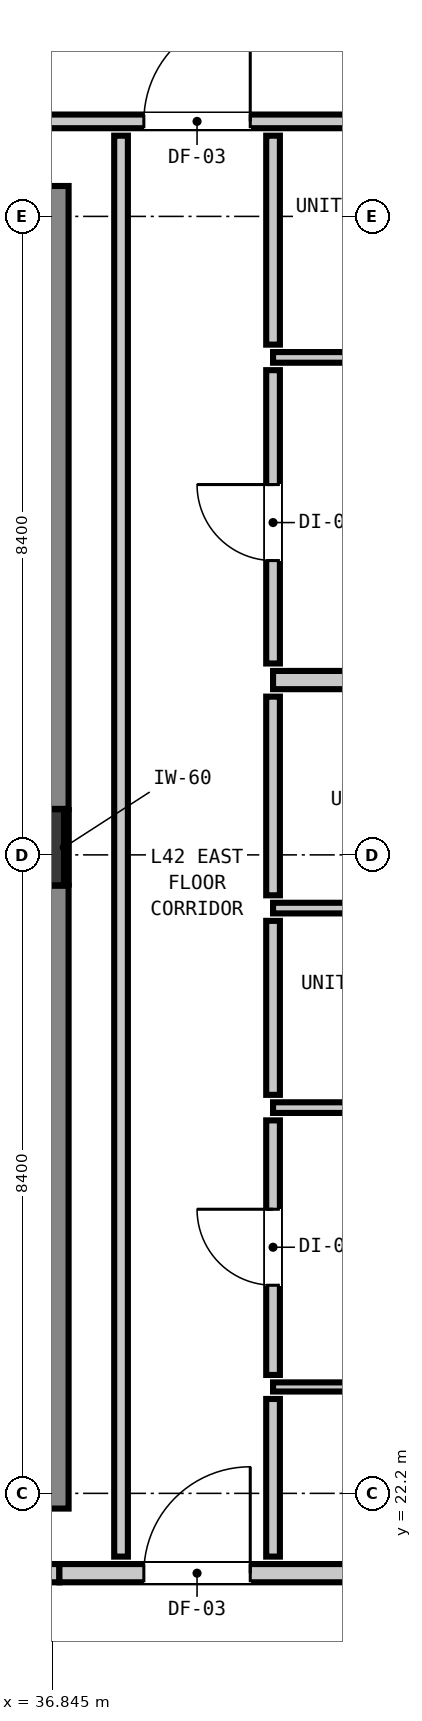
"""IFC4 building model, lengths in metres.
Left out: names, types, materials, properties, quantities, classifications, styles, units other than length and angle.
Written with IfcOpenShell. Run it as: python <this file> out.ifc"""

import sys

from ifc_helpers import new_model, si_unit, direction, frame, frame_2d, origin, origin_2d, place, context, subcontext, project, spatial, rectangle, extrude, element, fill, save


model = new_model("IFC4")
c1 = context("Model", 3, precision=1e-05, world=origin(), true_north=direction((0.0, 1.0)))
c2 = subcontext(c1, "Body", "Model", "MODEL_VIEW")
j1 = project(units=[si_unit("LENGTHUNIT", "METRE"), si_unit("PLANEANGLEUNIT", "RADIAN")], contexts=[c1])
p1 = place(None, origin())
s1 = spatial("IfcSite", under=j1, at=p1, CompositionType="ELEMENT")
p2 = place(p1, origin())
s2 = spatial("IfcBuilding", under=s1, at=p2, CompositionType="ELEMENT")
p3 = place(p2, frame((0.0, 0.0, 145.92)))
s3 = spatial("IfcBuildingStorey", under=s2, at=p3, CompositionType="ELEMENT", Elevation=145.92)
p4 = place(p3, frame((36.5, 30.7, 0.0), z_axis=(0.0, 0.0, 1.0), x_axis=(1.0, 0.0, 0.0)))
e1 = element("IfcColumn", 1, at=p4, inside=s3, PredefinedType="COLUMN", context=c2, shape_type="SweptSolid", body=[
    extrude(rectangle(XDim=1.0, YDim=1.0, at=origin_2d()), origin(), (0.0, 0.0, 1.0), 3.32),
])
p5 = place(p3, frame((36.56, 22.0, 0.0), z_axis=(0.0, 0.0, 1.0), x_axis=(0.0, 1.0, 0.0)))
e2 = element("IfcWall", 2, at=p5, inside=s3, PredefinedType="SHEAR", context=c2, shape_type="SweptSolid", body=[
    extrude(rectangle(XDim=8.195, YDim=1.0, at=frame_2d((4.098, 0.0))), origin(), (0.0, 0.0, 1.0), 3.32),
])
p6 = place(p3, frame((36.56, 31.205, 0.0), z_axis=(0.0, 0.0, 1.0), x_axis=(0.0, 1.0, 0.0)))
e3 = element("IfcWall", 3, at=p6, inside=s3, PredefinedType="SHEAR", context=c2, shape_type="SweptSolid", body=[
    extrude(rectangle(XDim=8.195, YDim=1.0, at=frame_2d((4.097, 0.0))), origin(), (0.0, 0.0, 1.0), 3.32),
])
p7 = place(p3, frame((9.407, 21.15, 0.0), z_axis=(0.0, 0.0, 1.0), x_axis=(1.0, 0.0, 0.0)))
e4 = element("IfcWall", 4, at=p7, inside=s3, PredefinedType="PARTITIONING", context=c2, shape_type="SweptSolid", body=[
    extrude(rectangle(XDim=27.532, YDim=0.24, at=frame_2d((13.766, 0.0))), origin(), (0.0, 0.0, 1.0), 3.08),
])
p8 = place(p7, frame((8.803, 0.0, 0.0)))
e5 = element("IfcOpeningElement", 5, at=p8, cuts=e4, PredefinedType="OPENING", context=c2, shape_type="SweptSolid", body=[
    extrude(rectangle(XDim=1.1, YDim=2.15, at=frame_2d((0.55, 1.075))), frame((0.0, 0.13, 0.0), z_axis=(0.0, -1.0, 0.0), x_axis=(1.0, 0.0, 0.0)), (0.0, 0.0, 1.0), 0.26),
])
p9 = place(p7, frame((1.192, 0.0, 0.0)))
e6 = element("IfcOpeningElement", 6, at=p9, cuts=e4, PredefinedType="OPENING", context=c2, shape_type="SweptSolid", body=[
    extrude(rectangle(XDim=1.4, YDim=2.15, at=frame_2d((0.7, 1.075))), frame((0.0, 0.13, 0.0), z_axis=(0.0, -1.0, 0.0), x_axis=(1.0, 0.0, 0.0)), (0.0, 0.0, 1.0), 0.26),
])
p10 = place(p3, frame((36.939, 21.15, 0.0), z_axis=(0.0, 0.0, 1.0), x_axis=(1.0, 0.0, 0.0)))
e7 = element("IfcWall", 7, at=p10, inside=s3, PredefinedType="PARTITIONING", context=c2, shape_type="SweptSolid", body=[
    extrude(rectangle(XDim=10.972, YDim=0.24, at=frame_2d((5.486, 0.0))), origin(), (0.0, 0.0, 1.0), 2.565),
])
p11 = place(p10, frame((1.111, 0.0, 0.0)))
e8 = element("IfcOpeningElement", 8, at=p11, cuts=e7, PredefinedType="OPENING", context=c2, shape_type="SweptSolid", body=[
    extrude(rectangle(XDim=1.4, YDim=2.15, at=frame_2d((0.7, 1.075))), frame((0.0, 0.13, 0.0), z_axis=(0.0, -1.0, 0.0), x_axis=(1.0, 0.0, 0.0)), (0.0, 0.0, 1.0), 0.26),
])
p12 = place(p3, frame((39.75, 32.9, 0.0), z_axis=(0.0, 0.0, 1.0), x_axis=(1.0, 0.0, 0.0)))
e9 = element("IfcWall", 9, at=p12, inside=s3, PredefinedType="PARTITIONING", context=c2, shape_type="SweptSolid", body=[
    extrude(rectangle(XDim=9.043, YDim=0.24, at=frame_2d((4.521, 0.0))), origin(), (0.0, 0.0, 1.0), 3.08),
])
p13 = place(p12, frame((4.075, 0.0, 0.0)))
e10 = element("IfcOpeningElement", 10, at=p13, cuts=e9, PredefinedType="OPENING", context=c2, shape_type="SweptSolid", body=[
    extrude(rectangle(XDim=0.9, YDim=2.1, at=frame_2d((0.45, 1.05))), frame((0.0, 0.13, 0.0), z_axis=(0.0, -1.0, 0.0), x_axis=(1.0, 0.0, 0.0)), (0.0, 0.0, 1.0), 0.26),
])
p14 = place(p3, frame((9.407, 40.25, 0.0), z_axis=(0.0, 0.0, 1.0), x_axis=(1.0, 0.0, 0.0)))
e11 = element("IfcWall", 11, at=p14, inside=s3, PredefinedType="PARTITIONING", context=c2, shape_type="SweptSolid", body=[
    extrude(rectangle(XDim=39.386, YDim=0.18, at=frame_2d((19.693, 0.0))), origin(), (0.0, 0.0, 1.0), 3.08),
])
p15 = place(p14, frame((8.028, 0.0, 0.0)))
e12 = element("IfcOpeningElement", 12, at=p15, cuts=e11, PredefinedType="OPENING", context=c2, shape_type="SweptSolid", body=[
    extrude(rectangle(XDim=1.4, YDim=2.15, at=frame_2d((0.7, 1.075))), frame((0.0, 0.1, 0.0), z_axis=(0.0, -1.0, 0.0), x_axis=(1.0, 0.0, 0.0)), (0.0, 0.0, 1.0), 0.2),
])
p16 = place(p14, frame((1.192, 0.0, 0.0)))
e13 = element("IfcOpeningElement", 13, at=p16, cuts=e11, PredefinedType="OPENING", context=c2, shape_type="SweptSolid", body=[
    extrude(rectangle(XDim=1.4, YDim=2.15, at=frame_2d((0.7, 1.075))), frame((0.0, 0.1, 0.0), z_axis=(0.0, -1.0, 0.0), x_axis=(1.0, 0.0, 0.0)), (0.0, 0.0, 1.0), 0.2),
])
p17 = place(p14, frame((28.643, 0.0, 0.0)))
e14 = element("IfcOpeningElement", 14, at=p17, cuts=e11, PredefinedType="OPENING", context=c2, shape_type="SweptSolid", body=[
    extrude(rectangle(XDim=1.4, YDim=2.15, at=frame_2d((0.7, 1.075))), frame((0.0, 0.1, 0.0), z_axis=(0.0, -1.0, 0.0), x_axis=(1.0, 0.0, 0.0)), (0.0, 0.0, 1.0), 0.2),
])
p18 = place(p3, frame((39.75, 27.275, 0.0), z_axis=(0.0, 0.0, 1.0), x_axis=(1.0, 0.0, 0.0)))
e15 = element("IfcWall", 15, at=p18, inside=s3, PredefinedType="PARTITIONING", context=c2, shape_type="SweptSolid", body=[
    extrude(rectangle(XDim=9.043, YDim=0.14, at=frame_2d((4.521, 0.0))), origin(), (0.0, 0.0, 1.0), 3.08),
])
p19 = place(p18, frame((1.708, 0.0, 0.0)))
e16 = element("IfcOpeningElement", 16, at=p19, cuts=e15, PredefinedType="OPENING", context=c2, shape_type="SweptSolid", body=[
    extrude(rectangle(XDim=0.86, YDim=2.02, at=frame_2d((0.43, 1.01))), frame((0.0, 0.08, 0.0), z_axis=(0.0, -1.0, 0.0), x_axis=(1.0, 0.0, 0.0)), (0.0, 0.0, 1.0), 0.16),
])
p20 = place(p18, frame((6.187, 0.0, 0.0)))
e17 = element("IfcOpeningElement", 17, at=p20, cuts=e15, PredefinedType="OPENING", context=c2, shape_type="SweptSolid", body=[
    extrude(rectangle(XDim=0.9, YDim=2.1, at=frame_2d((0.45, 1.05))), frame((0.0, 0.08, 0.0), z_axis=(0.0, -1.0, 0.0), x_axis=(1.0, 0.0, 0.0)), (0.0, 0.0, 1.0), 0.16),
])
p21 = place(p3, frame((39.75, 29.9, 0.0), z_axis=(0.0, 0.0, 1.0), x_axis=(1.0, 0.0, 0.0)))
e18 = element("IfcWall", 18, at=p21, inside=s3, PredefinedType="PARTITIONING", context=c2, shape_type="SweptSolid", body=[
    extrude(rectangle(XDim=9.043, YDim=0.14, at=frame_2d((4.521, 0.0))), origin(), (0.0, 0.0, 1.0), 3.08),
])
p22 = place(p3, frame((39.75, 37.145, 0.0), z_axis=(0.0, 0.0, 1.0), x_axis=(1.0, 0.0, 0.0)))
e19 = element("IfcWall", 19, at=p22, inside=s3, PredefinedType="PARTITIONING", context=c2, shape_type="SweptSolid", body=[
    extrude(rectangle(XDim=9.043, YDim=0.14, at=frame_2d((4.521, 0.0))), origin(), (0.0, 0.0, 1.0), 3.08),
])
p23 = place(p22, frame((1.708, 0.0, 0.0)))
e20 = element("IfcOpeningElement", 20, at=p23, cuts=e19, PredefinedType="OPENING", context=c2, shape_type="SweptSolid", body=[
    extrude(rectangle(XDim=0.86, YDim=2.02, at=frame_2d((0.43, 1.01))), frame((0.0, 0.08, 0.0), z_axis=(0.0, -1.0, 0.0), x_axis=(1.0, 0.0, 0.0)), (0.0, 0.0, 1.0), 0.16),
])
p24 = place(p22, frame((6.187, 0.0, 0.0)))
e21 = element("IfcOpeningElement", 21, at=p24, cuts=e19, PredefinedType="OPENING", context=c2, shape_type="SweptSolid", body=[
    extrude(rectangle(XDim=0.9, YDim=2.1, at=frame_2d((0.45, 1.05))), frame((0.0, 0.08, 0.0), z_axis=(0.0, -1.0, 0.0), x_axis=(1.0, 0.0, 0.0)), (0.0, 0.0, 1.0), 0.16),
])
p25 = place(p3, frame((39.75, 23.6, 0.0), z_axis=(0.0, 0.0, 1.0), x_axis=(1.0, 0.0, 0.0)))
e22 = element("IfcWall", 22, at=p25, inside=s3, PredefinedType="PARTITIONING", context=c2, shape_type="SweptSolid", body=[
    extrude(rectangle(XDim=9.043, YDim=0.12, at=frame_2d((4.521, 0.0))), origin(), (0.0, 0.0, 1.0), 3.08),
])
p26 = place(p25, frame((4.075, 0.0, 0.0)))
e23 = element("IfcOpeningElement", 23, at=p26, cuts=e22, PredefinedType="OPENING", context=c2, shape_type="SweptSolid", body=[
    extrude(rectangle(XDim=0.9, YDim=2.1, at=frame_2d((0.45, 1.05))), frame((0.0, 0.07, 0.0), z_axis=(0.0, -1.0, 0.0), x_axis=(1.0, 0.0, 0.0)), (0.0, 0.0, 1.0), 0.14),
])
p27 = place(p3, frame((37.75, 21.368, 0.0), z_axis=(0.0, 0.0, 1.0), x_axis=(0.0, 1.0, 0.0)))
e24 = element("IfcWall", 24, at=p27, inside=s3, PredefinedType="PARTITIONING", context=c2, shape_type="SweptSolid", body=[
    extrude(rectangle(XDim=18.694, YDim=0.18, at=frame_2d((9.347, 0.0))), origin(), (0.0, 0.0, 1.0), 3.08),
])
p28 = place(p3, frame((39.75, 21.368, 0.0), z_axis=(0.0, 0.0, 1.0), x_axis=(0.0, 1.0, 0.0)))
e25 = element("IfcWall", 25, at=p28, inside=s3, PredefinedType="PARTITIONING", context=c2, shape_type="SweptSolid", body=[
    extrude(rectangle(XDim=2.074, YDim=0.18, at=frame_2d((1.037, 0.0))), origin(), (0.0, 0.0, 1.0), 3.08),
])
p29 = place(p3, frame((39.75, 23.758, 0.0), z_axis=(0.0, 0.0, 1.0), x_axis=(0.0, 1.0, 0.0)))
e26 = element("IfcWall", 26, at=p29, inside=s3, PredefinedType="PARTITIONING", context=c2, shape_type="SweptSolid", body=[
    extrude(rectangle(XDim=3.349, YDim=0.18, at=frame_2d((1.674, 0.0))), origin(), (0.0, 0.0, 1.0), 3.08),
])
p30 = place(p29, frame((1.18, 0.0, 0.0)))
e27 = element("IfcOpeningElement", 27, at=p30, cuts=e26, PredefinedType="OPENING", context=c2, shape_type="SweptSolid", body=[
    extrude(rectangle(XDim=1.0, YDim=2.15, at=frame_2d((0.5, 1.075))), frame((0.0, 0.1, 0.0), z_axis=(0.0, -1.0, 0.0), x_axis=(1.0, 0.0, 0.0)), (0.0, 0.0, 1.0), 0.2),
])
p31 = place(p3, frame((39.75, 27.443, 0.0), z_axis=(0.0, 0.0, 1.0), x_axis=(0.0, 1.0, 0.0)))
e28 = element("IfcWall", 28, at=p31, inside=s3, PredefinedType="PARTITIONING", context=c2, shape_type="SweptSolid", body=[
    extrude(rectangle(XDim=2.289, YDim=0.18, at=frame_2d((1.145, 0.0))), origin(), (0.0, 0.0, 1.0), 3.08),
])
p32 = place(p3, frame((39.75, 30.068, 0.0), z_axis=(0.0, 0.0, 1.0), x_axis=(0.0, 1.0, 0.0)))
e29 = element("IfcWall", 29, at=p32, inside=s3, PredefinedType="PARTITIONING", context=c2, shape_type="SweptSolid", body=[
    extrude(rectangle(XDim=2.614, YDim=0.18, at=frame_2d((1.307, 0.0))), origin(), (0.0, 0.0, 1.0), 3.08),
])
p33 = place(p3, frame((39.75, 33.118, 0.0), z_axis=(0.0, 0.0, 1.0), x_axis=(0.0, 1.0, 0.0)))
e30 = element("IfcWall", 30, at=p33, inside=s3, PredefinedType="PARTITIONING", context=c2, shape_type="SweptSolid", body=[
    extrude(rectangle(XDim=3.859, YDim=0.18, at=frame_2d((1.93, 0.0))), origin(), (0.0, 0.0, 1.0), 3.08),
])
p34 = place(p33, frame((1.354, 0.0, 0.0)))
e31 = element("IfcOpeningElement", 31, at=p34, cuts=e30, PredefinedType="OPENING", context=c2, shape_type="SweptSolid", body=[
    extrude(rectangle(XDim=1.0, YDim=2.15, at=frame_2d((0.5, 1.075))), frame((0.0, 0.1, 0.0), z_axis=(0.0, -1.0, 0.0), x_axis=(1.0, 0.0, 0.0)), (0.0, 0.0, 1.0), 0.2),
])
p35 = place(p3, frame((39.75, 37.313, 0.0), z_axis=(0.0, 0.0, 1.0), x_axis=(0.0, 1.0, 0.0)))
e32 = element("IfcWall", 32, at=p35, inside=s3, PredefinedType="PARTITIONING", context=c2, shape_type="SweptSolid", body=[
    extrude(rectangle(XDim=2.749, YDim=0.18, at=frame_2d((1.375, 0.0))), origin(), (0.0, 0.0, 1.0), 3.08),
])
p36 = place(p3, frame((37.032, 30.21, 0.0), z_axis=(0.0, 0.0, 1.0), x_axis=(0.0, 1.0, 0.0)))
e33 = element("IfcWall", 33, at=p36, inside=s3, PredefinedType="PARTITIONING", context=c2, shape_type="SweptSolid", body=[
    extrude(rectangle(XDim=0.98, YDim=0.06, at=frame_2d((0.49, 0.0))), origin(), (0.0, 0.0, 1.0), 1.45),
])
p37 = place(p11, origin())
e34 = element("IfcDoor", 34, at=p37, inside=s3, OperationType="SINGLE_SWING_RIGHT", PredefinedType="DOOR", context=c2, shape_type="SweptSolid", body=[
    extrude(rectangle(XDim=1.4, YDim=2.15, at=frame_2d((0.7, 1.075))), frame((0.0, 0.025, 0.0), z_axis=(0.0, -1.0, 0.0), x_axis=(1.0, 0.0, 0.0)), (0.0, 0.0, 1.0), 0.05),
])
fill(e8, e34)
p38 = place(p17, origin())
e35 = element("IfcDoor", 35, at=p38, inside=s3, OperationType="SINGLE_SWING_RIGHT", PredefinedType="DOOR", context=c2, shape_type="SweptSolid", body=[
    extrude(rectangle(XDim=1.4, YDim=2.15, at=frame_2d((0.7, 1.075))), frame((0.0, 0.025, 0.0), z_axis=(0.0, -1.0, 0.0), x_axis=(1.0, 0.0, 0.0)), (0.0, 0.0, 1.0), 0.05),
])
fill(e14, e35)
p39 = place(p30, origin())
e36 = element("IfcDoor", 36, at=p39, inside=s3, OperationType="SINGLE_SWING_RIGHT", PredefinedType="DOOR", context=c2, shape_type="SweptSolid", body=[
    extrude(rectangle(XDim=1.0, YDim=2.15, at=frame_2d((0.5, 1.075))), frame((0.0, 0.025, 0.0), z_axis=(0.0, -1.0, 0.0), x_axis=(1.0, 0.0, 0.0)), (0.0, 0.0, 1.0), 0.05),
])
fill(e27, e36)
p40 = place(p34, origin())
e37 = element("IfcDoor", 37, at=p40, inside=s3, OperationType="SINGLE_SWING_RIGHT", PredefinedType="DOOR", context=c2, shape_type="SweptSolid", body=[
    extrude(rectangle(XDim=1.0, YDim=2.15, at=frame_2d((0.5, 1.075))), frame((0.0, 0.025, 0.0), z_axis=(0.0, -1.0, 0.0), x_axis=(1.0, 0.0, 0.0)), (0.0, 0.0, 1.0), 0.05),
])
fill(e31, e37)
save(model, sys.argv[1])
